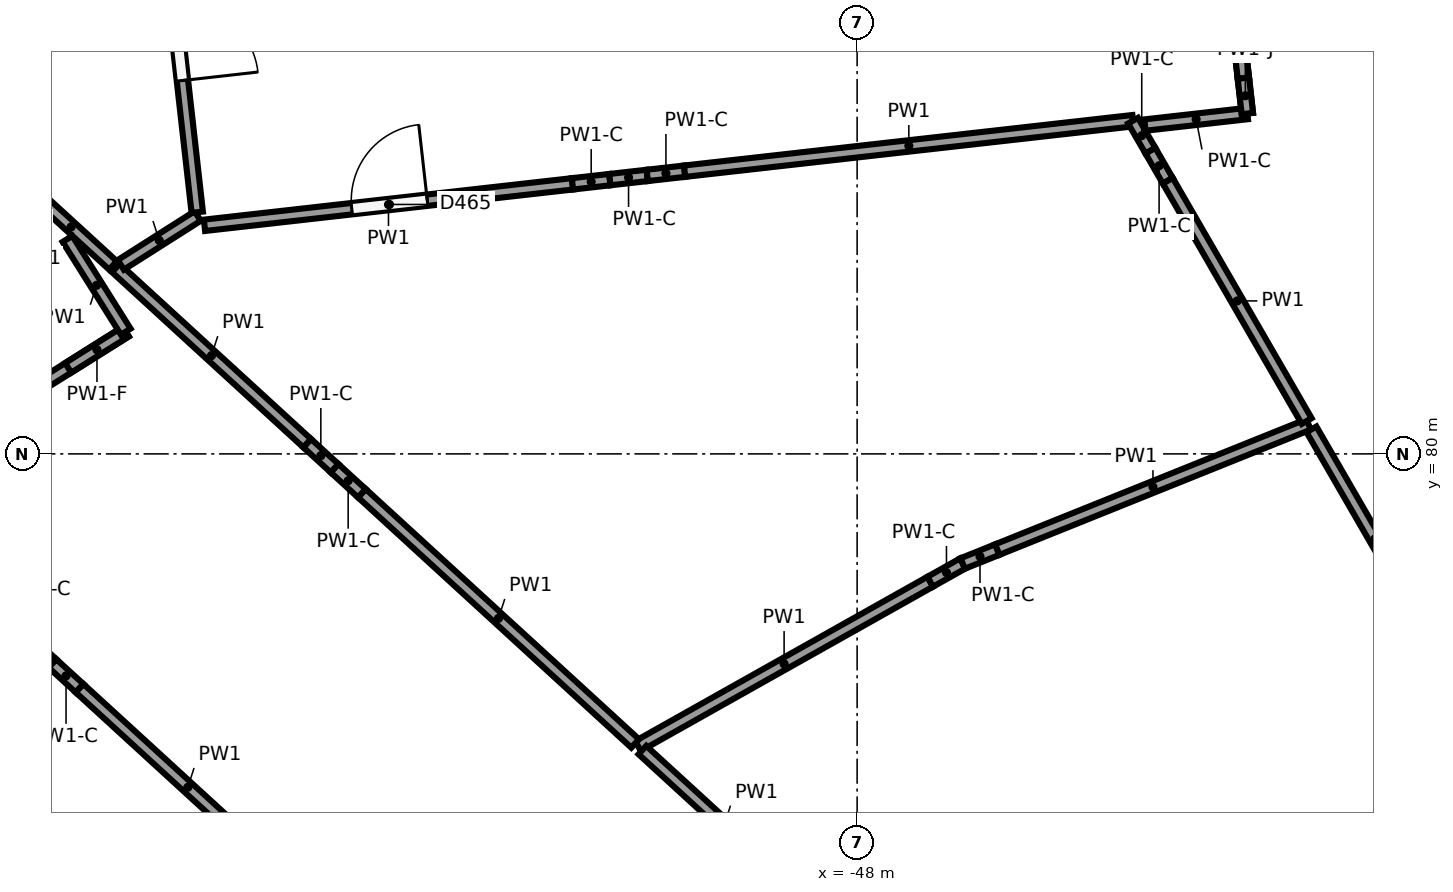
"""IFC4 building model, lengths in metres.
Left out: names, types, materials, properties, quantities, classifications, styles, units other than length and angle.
Written with IfcOpenShell. Run it as: python <this file> out.ifc"""

import sys

from ifc_helpers import new_model, si_unit, direction, frame, frame_2d, origin, origin_2d, place, context, subcontext, project, spatial, rectangle, circle, extrude, element, fill, save


model = new_model("IFC4")
c1 = context("Model", 3, precision=1e-05, world=origin(), true_north=direction((0.0, 1.0)))
c2 = subcontext(c1, "Body", "Model", "MODEL_VIEW")
j1 = project(units=[si_unit("LENGTHUNIT", "METRE"), si_unit("PLANEANGLEUNIT", "RADIAN")], contexts=[c1])
p1 = place(None, origin())
s1 = spatial("IfcSite", under=j1, at=p1, CompositionType="ELEMENT")
p2 = place(p1, origin())
s2 = spatial("IfcBuilding", under=s1, at=p2, CompositionType="ELEMENT")
p3 = place(p2, frame((0.0, 0.0, -4.0)))
s3 = spatial("IfcBuildingStorey", under=s2, at=p3, CompositionType="ELEMENT", Elevation=-4.0)
p4 = place(p3, frame((-42.016, 84.707, -0.4), z_axis=(0.0, 0.0, 1.0), x_axis=(1.0, 0.0, 0.0)))
e1 = element("IfcColumn", 1, at=p4, inside=s3, PredefinedType="COLUMN", context=c2, shape_type="SweptSolid", body=[
    extrude(circle(Radius=0.4, at=origin_2d()), origin(), (0.0, 0.0, 1.0), 4.4),
])
p5 = place(p3, frame((-44.39, 75.806, -0.4), z_axis=(0.0, 0.0, 1.0), x_axis=(1.0, 0.0, 0.0)))
e2 = element("IfcColumn", 2, at=p5, inside=s3, PredefinedType="COLUMN", context=c2, shape_type="SweptSolid", body=[
    extrude(circle(Radius=0.35, at=origin_2d()), origin(), (0.0, 0.0, 1.0), 4.4),
])
p6 = place(p3, frame((-49.791, 82.499, -0.4), z_axis=(0.0, 0.0, 1.0), x_axis=(1.0, 0.0, 0.0)))
e3 = element("IfcColumn", 3, at=p6, inside=s3, PredefinedType="COLUMN", context=c2, shape_type="SweptSolid", body=[
    extrude(circle(Radius=0.4, at=origin_2d()), origin(), (0.0, 0.0, 1.0), 4.4),
])
p7 = place(p3, frame((-56.915, 78.696, -0.4), z_axis=(0.0, 0.0, 1.0), x_axis=(1.0, 0.0, 0.0)))
e4 = element("IfcColumn", 4, at=p7, inside=s3, PredefinedType="COLUMN", context=c2, shape_type="SweptSolid", body=[
    extrude(circle(Radius=0.45, at=origin_2d()), origin(), (0.0, 0.0, 1.0), 4.4),
])
p8 = place(p3, frame((-50.883, 76.157, 0.0), z_axis=(0.0, 0.0, 1.0), x_axis=(0.871726265014, 0.489993182487, 0.0)))
e5 = element("IfcWall", 5, at=p8, inside=s3, PredefinedType="PARTITIONING", context=c2, shape_type="SweptSolid", body=[
    extrude(rectangle(XDim=4.411, YDim=0.15, at=frame_2d((2.206, 0.0))), origin(), (0.0, 0.0, 1.0), 3.6),
])
p9 = place(p3, frame((-47.038, 78.318, 0.0), z_axis=(0.0, 0.0, 1.0), x_axis=(0.871868098828, 0.489740766371, 0.0)))
e6 = element("IfcWall", 6, at=p9, inside=s3, PredefinedType="PARTITIONING", context=c2, shape_type="SweptSolid", body=[
    extrude(rectangle(XDim=0.49, YDim=0.15, at=frame_2d((0.245, 0.0))), origin(), (0.0, 0.0, 1.0), 2.7),
])
p10 = place(p3, frame((-46.611, 78.558, 0.0), z_axis=(0.0, 0.0, 1.0), x_axis=(0.927719635042, 0.373277750151, 0.0)))
e7 = element("IfcWall", 7, at=p10, inside=s3, PredefinedType="PARTITIONING", context=c2, shape_type="SweptSolid", body=[
    extrude(rectangle(XDim=0.49, YDim=0.15, at=frame_2d((0.245, 0.0))), origin(), (0.0, 0.0, 1.0), 2.7),
])
p11 = place(p3, frame((-46.156, 78.741, 0.0), z_axis=(0.0, 0.0, 1.0), x_axis=(0.927823061979, 0.373020596832, 0.0)))
e8 = element("IfcWall", 8, at=p11, inside=s3, PredefinedType="PARTITIONING", context=c2, shape_type="SweptSolid", body=[
    extrude(rectangle(XDim=4.415, YDim=0.15, at=frame_2d((2.207, 0.0))), origin(), (0.0, 0.0, 1.0), 3.6),
])
p12 = place(p3, frame((-42.022, 80.323, 0.0), z_axis=(0.0, 0.0, 1.0), x_axis=(0.500458314394, -0.865760634098, 0.0)))
e9 = element("IfcWall", 9, at=p12, inside=s3, PredefinedType="PARTITIONING", context=c2, shape_type="SweptSolid", body=[
    extrude(rectangle(XDim=3.331, YDim=0.15, at=frame_2d((1.666, 0.0))), origin(), (0.0, 0.0, 1.0), 3.6),
])
p13 = place(p3, frame((-48.671, 74.132, 0.0), z_axis=(0.0, 0.0, 1.0), x_axis=(-0.737605152987, 0.675232284689, 0.0)))
e10 = element("IfcWall", 10, at=p13, inside=s3, PredefinedType="PARTITIONING", context=c2, shape_type="SweptSolid", body=[
    extrude(rectangle(XDim=2.92, YDim=0.15, at=frame_2d((1.46, 0.0))), origin(), (0.0, 0.0, 1.0), 3.6),
])
p14 = place(p3, frame((-50.92, 76.19, 0.0), z_axis=(0.0, 0.0, 1.0), x_axis=(-0.737613311295, 0.675223372671, 0.0)))
e11 = element("IfcWall", 11, at=p14, inside=s3, PredefinedType="PARTITIONING", context=c2, shape_type="SweptSolid", body=[
    extrude(rectangle(XDim=4.876, YDim=0.15, at=frame_2d((2.438, 0.0))), origin(), (0.0, 0.0, 1.0), 3.6),
])
for number, where, z_axis, x_axis in (
    (12, (-54.517, 79.483, 0.0), (0.0, 0.0, 1.0), (-0.737, 0.675, 0.0)),
    (13, (-54.876, 79.812, 0.0), (0.0, 0.0, 1.0), (-0.738, 0.675, 0.0)),
):
    element("IfcWall", number, at=place(p3, frame(where, z_axis=z_axis, x_axis=x_axis)), inside=s3, PredefinedType="PARTITIONING", context=c2, shape_type="SweptSolid", body=[
        extrude(rectangle(XDim=0.488, YDim=0.15, at=frame_2d((0.244, 0.0))), origin(), (0.0, 0.0, 1.0), 2.7),
    ])
p15 = place(p3, frame((-55.236, 80.141, 0.0), z_axis=(0.0, 0.0, 1.0), x_axis=(-0.737605282211, 0.675232143529, 0.0)))
e14 = element("IfcWall", 14, at=p15, inside=s3, PredefinedType="PARTITIONING", context=c2, shape_type="SweptSolid", body=[
    extrude(rectangle(XDim=3.413, YDim=0.15, at=frame_2d((1.707, 0.0))), origin(), (0.0, 0.0, 1.0), 3.6),
])
p16 = place(p3, frame((-57.688, 82.487, 0.0), z_axis=(0.0, 0.0, 1.0), x_axis=(0.844198175742, 0.536031193192, 0.0)))
e15 = element("IfcWall", 15, at=p16, inside=s3, PredefinedType="PARTITIONING", context=c2, shape_type="SweptSolid", body=[
    extrude(rectangle(XDim=1.198, YDim=0.15, at=frame_2d((0.599, 0.0))), origin(), (0.0, 0.0, 1.0), 3.6),
])
p17 = place(p3, frame((-56.587, 83.007, 0.0), z_axis=(0.0, 0.0, 1.0), x_axis=(0.993710844617, 0.111976592605, 0.0)))
e16 = element("IfcWall", 16, at=p17, inside=s3, PredefinedType="PARTITIONING", context=c2, shape_type="SweptSolid", body=[
    extrude(rectangle(XDim=4.873, YDim=0.15, at=frame_2d((2.437, 0.0))), origin(), (0.0, 0.0, 1.0), 3.6),
])
p18 = place(p17, frame((1.95, 0.0, 0.0)))
e17 = element("IfcOpeningElement", 17, at=p18, cuts=e16, PredefinedType="OPENING", context=c2, shape_type="SweptSolid", body=[
    extrude(rectangle(XDim=1.0, YDim=2.1, at=frame_2d((0.5, 1.05))), frame((0.0, 0.085, 0.0), z_axis=(0.0, -1.0, 0.0), x_axis=(1.0, 0.0, 0.0)), (0.0, 0.0, 1.0), 0.17),
])
for number, where, z_axis, x_axis in (
    (18, (-51.745, 83.553, 0.0), (0.0, 0.0, 1.0), (0.994, 0.112, 0.0)),
    (19, (-51.253, 83.608, 0.0), (0.0, 0.0, 1.0), (0.994, 0.112, 0.0)),
    (20, (-50.761, 83.664, 0.0), (0.0, 0.0, 1.0), (0.994, 0.112, 0.0)),
):
    element("IfcWall", number, at=place(p3, frame(where, z_axis=z_axis, x_axis=x_axis)), inside=s3, PredefinedType="PARTITIONING", context=c2, shape_type="SweptSolid", body=[
        extrude(rectangle(XDim=0.495, YDim=0.15, at=frame_2d((0.248, 0.0))), origin(), (0.0, 0.0, 1.0), 2.7),
    ])
p19 = place(p3, frame((-50.27, 83.719, 0.0), z_axis=(0.0, 0.0, 1.0), x_axis=(0.993712058641, 0.1119658185, 0.0)))
e21 = element("IfcWall", 21, at=p19, inside=s3, PredefinedType="PARTITIONING", context=c2, shape_type="SweptSolid", body=[
    extrude(rectangle(XDim=5.938, YDim=0.15, at=frame_2d((2.969, 0.0))), origin(), (0.0, 0.0, 1.0), 3.6),
])
p20 = place(p3, frame((-44.37, 84.384, 0.0), z_axis=(0.0, 0.0, 1.0), x_axis=(0.500509211412, -0.865731210765, 0.0)))
e22 = element("IfcWall", 22, at=p20, inside=s3, PredefinedType="PARTITIONING", context=c2, shape_type="SweptSolid", body=[
    extrude(rectangle(XDim=0.457, YDim=0.15, at=frame_2d((0.228, 0.0))), origin(), (0.0, 0.0, 1.0), 2.7),
])
p21 = place(p3, frame((-44.141, 83.989, 0.0), z_axis=(0.0, 0.0, 1.0), x_axis=(0.500741003624, -0.865597162247, 0.0)))
e23 = element("IfcWall", 23, at=p21, inside=s3, PredefinedType="PARTITIONING", context=c2, shape_type="SweptSolid", body=[
    extrude(rectangle(XDim=0.456, YDim=0.15, at=frame_2d((0.228, 0.0))), origin(), (0.0, 0.0, 1.0), 2.7),
])
p22 = place(p3, frame((-43.913, 83.594, 0.0), z_axis=(0.0, 0.0, 1.0), x_axis=(0.500416823079, -0.865784617084, 0.0)))
e24 = element("IfcWall", 24, at=p22, inside=s3, PredefinedType="PARTITIONING", context=c2, shape_type="SweptSolid", body=[
    extrude(rectangle(XDim=3.652, YDim=0.15, at=frame_2d((1.826, 0.0))), origin(), (0.0, 0.0, 1.0), 3.6),
])
p23 = place(p3, frame((-57.79, 82.479, 0.0), z_axis=(0.0, 0.0, 1.0), x_axis=(-0.737580634044, 0.675259067531, 0.0)))
e25 = element("IfcWall", 25, at=p23, inside=s3, PredefinedType="PARTITIONING", context=c2, shape_type="SweptSolid", body=[
    extrude(rectangle(XDim=1.496, YDim=0.15, at=frame_2d((0.748, 0.0))), origin(), (0.0, 0.0, 1.0), 3.6),
])
p24 = place(p3, frame((-57.18, 87.595, 0.0), z_axis=(0.0, 0.0, 1.0), x_axis=(0.112023313707, -0.993705578723, 0.0)))
e26 = element("IfcWall", 26, at=p24, inside=s3, PredefinedType="PARTITIONING", context=c2, shape_type="SweptSolid", body=[
    extrude(rectangle(XDim=4.444, YDim=0.15, at=frame_2d((2.222, 0.0))), origin(), (0.0, 0.0, 1.0), 3.6),
])
p25 = place(p24, frame((1.7, 0.0, 0.0)))
e27 = element("IfcOpeningElement", 27, at=p25, cuts=e26, PredefinedType="OPENING", context=c2, shape_type="SweptSolid", body=[
    extrude(rectangle(XDim=1.0, YDim=2.1, at=frame_2d((0.5, 1.05))), frame((0.0, 0.085, 0.0), z_axis=(0.0, -1.0, 0.0), x_axis=(1.0, 0.0, 0.0)), (0.0, 0.0, 1.0), 0.17),
])
p26 = place(p3, frame((-58.942, 77.569, 0.0), z_axis=(0.0, 0.0, 1.0), x_axis=(0.737531982112, -0.675312205844, 0.0)))
e28 = element("IfcWall", 28, at=p26, inside=s3, PredefinedType="PARTITIONING", context=c2, shape_type="SweptSolid", body=[
    extrude(rectangle(XDim=0.483, YDim=0.15, at=frame_2d((0.241, 0.0))), origin(), (0.0, 0.0, 1.0), 2.7),
])
p27 = place(p3, frame((-58.586, 77.243, 0.0), z_axis=(0.0, 0.0, 1.0), x_axis=(0.737762545062, -0.675060313679, 0.0)))
e29 = element("IfcWall", 29, at=p27, inside=s3, PredefinedType="PARTITIONING", context=c2, shape_type="SweptSolid", body=[
    extrude(rectangle(XDim=0.483, YDim=0.15, at=frame_2d((0.241, 0.0))), origin(), (0.0, 0.0, 1.0), 2.7),
])
p28 = place(p3, frame((-58.23, 76.917, 0.0), z_axis=(0.0, 0.0, 1.0), x_axis=(0.737586985775, -0.675252129516, 0.0)))
e30 = element("IfcWall", 30, at=p28, inside=s3, PredefinedType="PARTITIONING", context=c2, shape_type="SweptSolid", body=[
    extrude(rectangle(XDim=3.862, YDim=0.15, at=frame_2d((1.931, 0.0))), origin(), (0.0, 0.0, 1.0), 3.6),
])
p29 = place(p3, frame((-44.214, 84.326, 0.0), z_axis=(0.0, 0.0, 1.0), x_axis=(0.993715812814, 0.11193249467, 0.0)))
e31 = element("IfcWall", 31, at=p29, inside=s3, PredefinedType="PARTITIONING", context=c2, shape_type="SweptSolid", body=[
    extrude(rectangle(XDim=1.357, YDim=0.15, at=frame_2d((0.678, 0.0))), origin(), (0.0, 0.0, 1.0), 2.7),
])
p30 = place(p3, frame((-42.865, 84.478, 0.0), z_axis=(0.0, 0.0, 1.0), x_axis=(-0.111977823114, 0.993710705956, 0.0)))
e32 = element("IfcWall", 32, at=p30, inside=s3, PredefinedType="PARTITIONING", context=c2, shape_type="SweptSolid", body=[
    extrude(rectangle(XDim=7.26, YDim=0.15, at=frame_2d((3.63, 0.0))), origin(), (0.0, 0.0, 1.0), 2.5),
])
p31 = place(p3, frame((-42.865, 84.478, 2.5), z_axis=(0.0, 0.0, 1.0), x_axis=(-0.112198709192, 0.993685790205, 0.0)))
e33 = element("IfcWall", 33, at=p31, inside=s3, PredefinedType="PARTITIONING", context=c2, shape_type="SweptSolid", body=[
    extrude(rectangle(XDim=0.47, YDim=0.15, at=frame_2d((0.235, 0.0))), origin(), (0.0, 0.0, 1.0), 0.2),
])
p32 = place(p3, frame((-42.918, 84.945, 2.5), z_axis=(0.0, 0.0, 1.0), x_axis=(-0.112027737715, 0.993705079982, 0.0)))
e34 = element("IfcWall", 34, at=p32, inside=s3, PredefinedType="PARTITIONING", context=c2, shape_type="SweptSolid", body=[
    extrude(rectangle(XDim=1.41, YDim=0.15, at=frame_2d((0.705, 0.0))), origin(), (0.0, 0.0, 1.0), 1.1),
])
p33 = place(p3, frame((-60.937, 79.525, 0.0), z_axis=(0.0, 0.0, 1.0), x_axis=(0.846734487447, 0.532015702558, 0.0)))
e35 = element("IfcWall", 35, at=p33, inside=s3, PredefinedType="PARTITIONING", context=c2, shape_type="SweptSolid", body=[
    extrude(rectangle(XDim=3.914, YDim=0.15, at=frame_2d((1.957, 0.0))), origin(), (0.0, 0.0, 1.0), 2.5),
])
p34 = place(p3, frame((-58.38, 81.132, 2.5), z_axis=(0.0, 0.0, 1.0), x_axis=(0.846738436485, 0.532009417379, 0.0)))
e36 = element("IfcWall", 36, at=p34, inside=s3, PredefinedType="PARTITIONING", context=c2, shape_type="SweptSolid", body=[
    extrude(rectangle(XDim=0.894, YDim=0.15, at=frame_2d((0.447, 0.0))), origin(), (0.0, 0.0, 1.0), 1.1),
])
p35 = place(p3, frame((-57.623, 81.608, 0.0), z_axis=(0.0, 0.0, 1.0), x_axis=(-0.532022375577, 0.846730294654, 0.0)))
e37 = element("IfcWall", 37, at=p35, inside=s3, PredefinedType="PARTITIONING", context=c2, shape_type="SweptSolid", body=[
    extrude(rectangle(XDim=1.441, YDim=0.15, at=frame_2d((0.721, 0.0))), origin(), (0.0, 0.0, 1.0), 3.6),
])
p36 = place(p18, origin())
e38 = element("IfcDoor", 38, at=p36, inside=s3, OperationType="SINGLE_SWING_RIGHT", PredefinedType="DOOR", context=c2, shape_type="SweptSolid", body=[
    extrude(rectangle(XDim=1.0, YDim=2.1, at=frame_2d((0.5, 1.05))), frame((0.0, 0.025, 0.0), z_axis=(0.0, -1.0, 0.0), x_axis=(1.0, 0.0, 0.0)), (0.0, 0.0, 1.0), 0.05),
])
fill(e17, e38)
p37 = place(p25, origin())
e39 = element("IfcDoor", 39, at=p37, inside=s3, OperationType="SINGLE_SWING_RIGHT", PredefinedType="DOOR", context=c2, shape_type="SweptSolid", body=[
    extrude(rectangle(XDim=1.0, YDim=2.1, at=frame_2d((0.5, 1.05))), frame((0.0, 0.025, 0.0), z_axis=(0.0, -1.0, 0.0), x_axis=(1.0, 0.0, 0.0)), (0.0, 0.0, 1.0), 0.05),
])
fill(e27, e39)
save(model, sys.argv[1])
